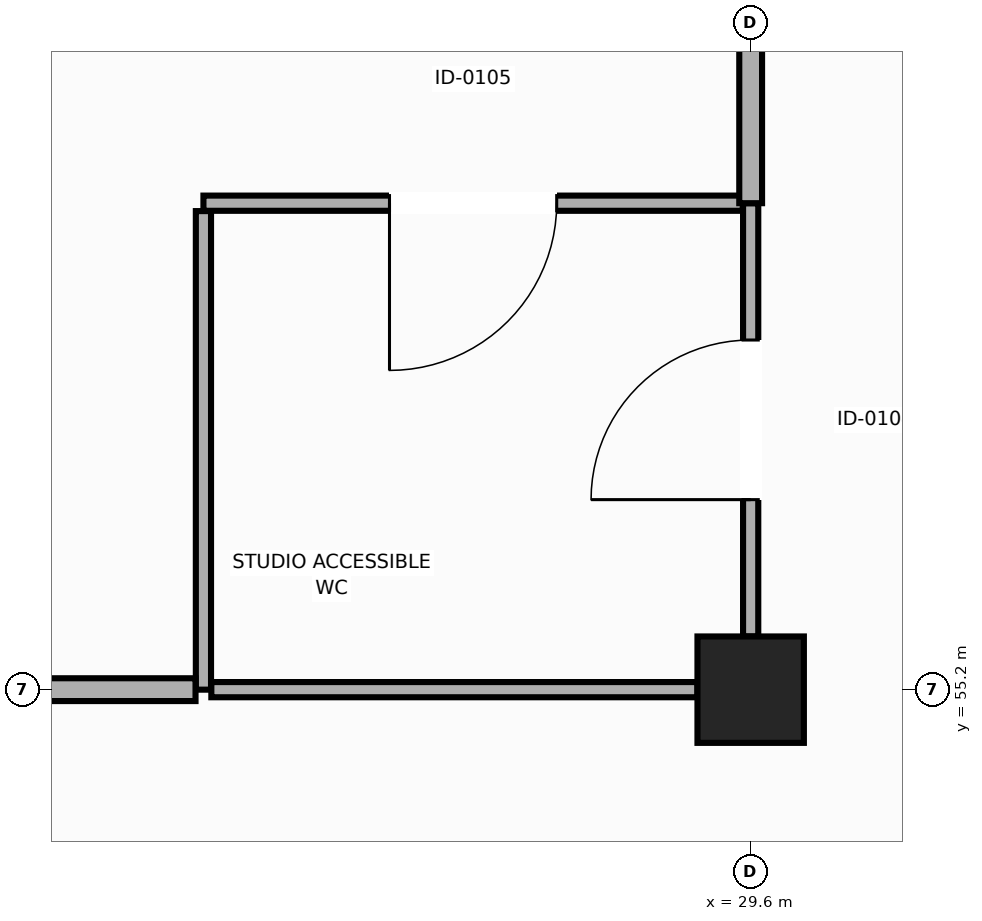
"""IFC4 building model, lengths in metres.
Left out: names, types, materials, properties, quantities, classifications, styles, units other than length and angle.
Written with IfcOpenShell. Run it as: python <this file> out.ifc"""

import sys

from ifc_helpers import new_model, si_unit, direction, frame, frame_2d, origin, origin_2d, place, context, subcontext, project, spatial, rectangle, extrude, element, fill, save


model = new_model("IFC4")
c1 = context("Model", 3, precision=1e-05, world=origin(), true_north=direction((0.0, 1.0)))
c2 = subcontext(c1, "Body", "Model", "MODEL_VIEW")
j1 = project(units=[si_unit("LENGTHUNIT", "METRE"), si_unit("PLANEANGLEUNIT", "RADIAN")], contexts=[c1])
p1 = place(None, origin())
s1 = spatial("IfcSite", under=j1, at=p1, CompositionType="ELEMENT")
p2 = place(p1, origin())
s2 = spatial("IfcBuilding", under=s1, at=p2, CompositionType="ELEMENT")
p3 = place(p2, origin())
s3 = spatial("IfcBuildingStorey", under=s2, at=p3, CompositionType="ELEMENT", Elevation=0.0)
p4 = place(p3, frame((29.6, 55.2, 0.0), z_axis=(0.0, 0.0, 1.0), x_axis=(1.0, 0.0, 0.0)))
e1 = element("IfcColumn", 1, at=p4, inside=s3, PredefinedType="COLUMN", context=c2, shape_type="SweptSolid", body=[
    extrude(rectangle(XDim=0.7, YDim=0.7, at=origin_2d()), origin(), (0.0, 0.0, 1.0), 5.4),
])
p5 = place(p3, frame((29.6, 55.55, 0.0), z_axis=(0.0, 0.0, 1.0), x_axis=(0.0, 1.0, 0.0)))
e2 = element("IfcWall", 2, at=p5, inside=s3, PredefinedType="PARTITIONING", context=c2, shape_type="SweptSolid", body=[
    extrude(rectangle(XDim=2.85, YDim=0.1, at=frame_2d((1.425, 0.0))), origin(), (0.0, 0.0, 1.0), 4.315),
])
p6 = place(p5, frame((0.9, 0.0, 0.0)))
e3 = element("IfcOpeningElement", 3, at=p6, cuts=e2, PredefinedType="OPENING", context=c2, shape_type="SweptSolid", body=[
    extrude(rectangle(XDim=1.05, YDim=2.12, at=frame_2d((0.525, 1.06))), frame((0.0, 0.06, 0.0), z_axis=(0.0, -1.0, 0.0), x_axis=(1.0, 0.0, 0.0)), (0.0, 0.0, 1.0), 0.12),
])
p7 = place(p3, frame((29.548, 58.4, 0.0), z_axis=(0.0, 0.0, 1.0), x_axis=(-1.0, 0.0, 0.0)))
e4 = element("IfcWall", 4, at=p7, inside=s3, PredefinedType="PARTITIONING", context=c2, shape_type="SweptSolid", body=[
    extrude(rectangle(XDim=3.548, YDim=0.1, at=frame_2d((1.774, 0.0))), origin(), (0.0, 0.0, 1.0), 5.12),
])
p8 = place(p7, frame((1.224, 0.0, 0.0)))
e5 = element("IfcOpeningElement", 5, at=p8, cuts=e4, PredefinedType="OPENING", context=c2, shape_type="SweptSolid", body=[
    extrude(rectangle(XDim=1.1, YDim=2.15, at=frame_2d((0.55, 1.075))), frame((0.0, 0.06, 0.0), z_axis=(0.0, -1.0, 0.0), x_axis=(1.0, 0.0, 0.0)), (0.0, 0.0, 1.0), 0.12),
])
p9 = place(p3, frame((26.0, 58.348, 0.0), z_axis=(0.0, 0.0, 1.0), x_axis=(0.0, -1.0, 0.0)))
e6 = element("IfcWall", 6, at=p9, inside=s3, PredefinedType="PARTITIONING", context=c2, shape_type="SweptSolid", body=[
    extrude(rectangle(XDim=3.148, YDim=0.1, at=frame_2d((1.574, 0.0))), origin(), (0.0, 0.0, 1.0), 4.315),
])
p10 = place(p3, frame((26.052, 55.2, 0.0), z_axis=(0.0, 0.0, 1.0), x_axis=(1.0, 0.0, 0.0)))
e7 = element("IfcWall", 7, at=p10, inside=s3, PredefinedType="PARTITIONING", context=c2, shape_type="SweptSolid", body=[
    extrude(rectangle(XDim=3.198, YDim=0.1, at=frame_2d((1.599, 0.0))), origin(), (0.0, 0.0, 1.0), 4.315),
])
p11 = place(p3, frame((25.948, 55.2, 0.0), z_axis=(0.0, 0.0, 1.0), x_axis=(-1.0, 0.0, 0.0)))
e8 = element("IfcWall", 8, at=p11, inside=s3, PredefinedType="PARTITIONING", context=c2, shape_type="SweptSolid", body=[
    extrude(rectangle(XDim=3.198, YDim=0.15, at=frame_2d((1.599, 0.0))), origin(), (0.0, 0.0, 1.0), 4.315),
])
p12 = place(p3, frame((29.6, 62.05, 0.0), z_axis=(0.0, 0.0, 1.0), x_axis=(0.0, -1.0, 0.0)))
e9 = element("IfcWall", 9, at=p12, inside=s3, PredefinedType="PARTITIONING", context=c2, shape_type="SweptSolid", body=[
    extrude(rectangle(XDim=3.65, YDim=0.15, at=frame_2d((1.825, 0.0))), origin(), (0.0, 0.0, 1.0), 4.315),
])
p13 = place(p6, origin())
e10 = element("IfcDoor", 10, at=p13, inside=s3, OperationType="SINGLE_SWING_LEFT", PredefinedType="DOOR", context=c2, shape_type="SweptSolid", body=[
    extrude(rectangle(XDim=1.05, YDim=2.12, at=frame_2d((0.525, 1.06))), frame((0.0, 0.025, 0.0), z_axis=(0.0, -1.0, 0.0), x_axis=(1.0, 0.0, 0.0)), (0.0, 0.0, 1.0), 0.05),
])
fill(e3, e10)
p14 = place(p8, origin())
e11 = element("IfcDoor", 11, at=p14, inside=s3, OperationType="SINGLE_SWING_RIGHT", PredefinedType="DOOR", context=c2, shape_type="SweptSolid", body=[
    extrude(rectangle(XDim=1.1, YDim=2.15, at=frame_2d((0.55, 1.075))), frame((0.0, 0.025, 0.0), z_axis=(0.0, -1.0, 0.0), x_axis=(1.0, 0.0, 0.0)), (0.0, 0.0, 1.0), 0.05),
])
fill(e5, e11)
save(model, sys.argv[1])
